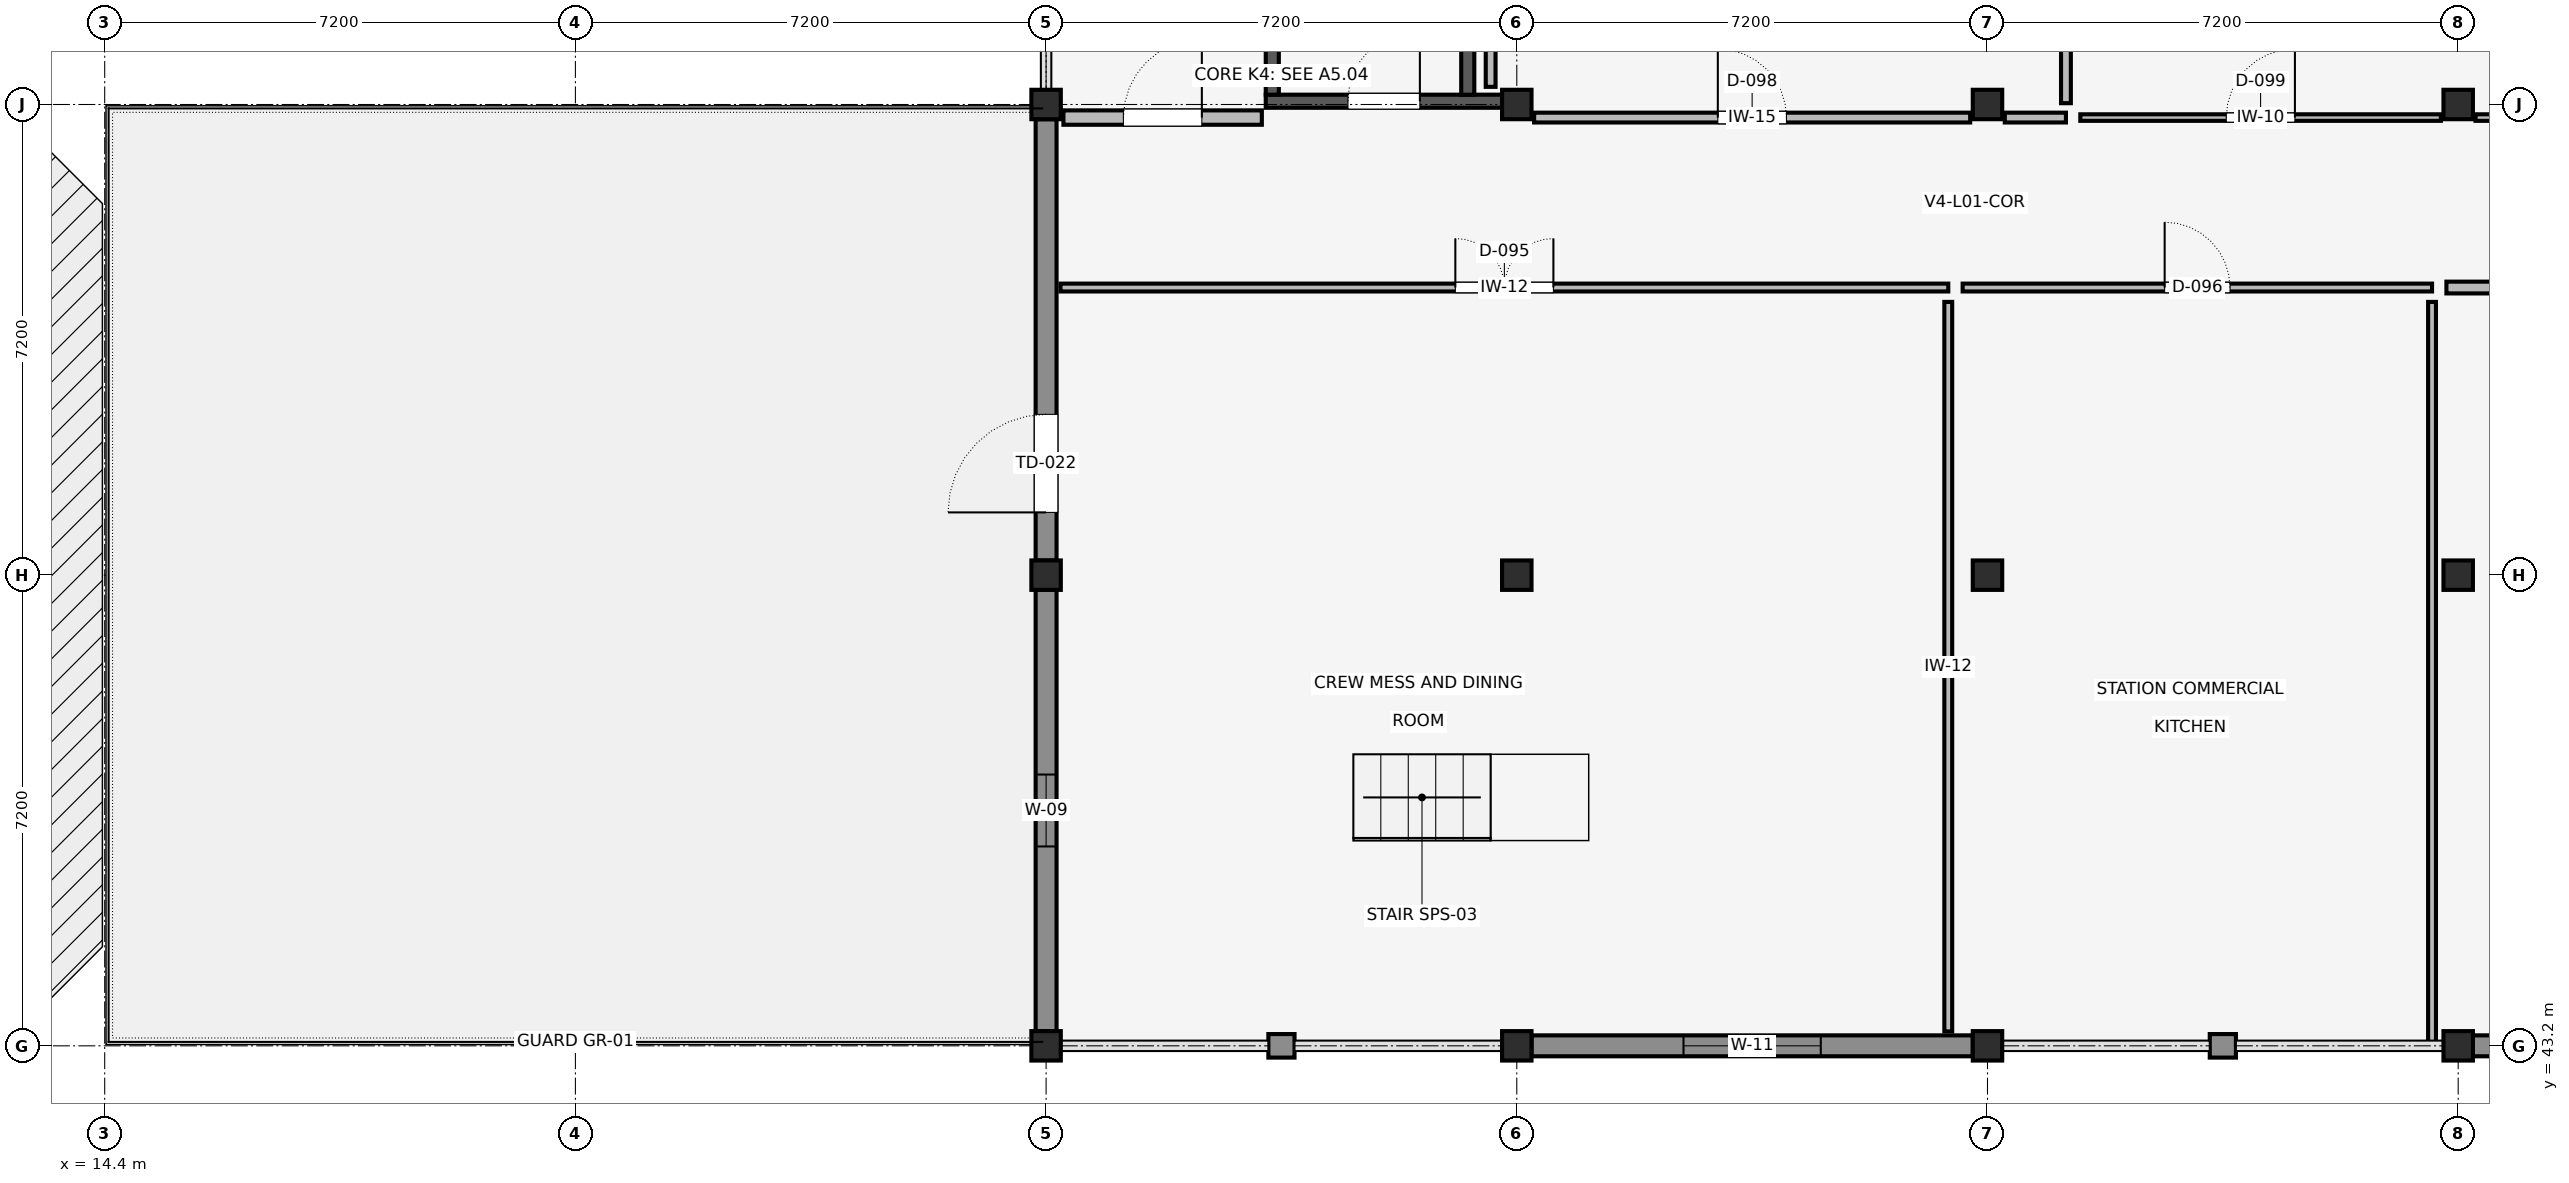
"""IFC4 building model, lengths in metres.
Left out: names, types, materials, properties, quantities, classifications, styles, units other than length and angle.
Written with IfcOpenShell. Run it as: python <this file> out.ifc"""

import sys

from ifc_helpers import new_model, si_unit, direction, frame, frame_2d, origin, origin_2d, place, context, subcontext, project, spatial, rectangle, extrude, element, fill, save


model = new_model("IFC4")
c1 = context("Model", 3, precision=1e-05, world=origin(), true_north=direction((0.0, 1.0)))
c2 = subcontext(c1, "Body", "Model", "MODEL_VIEW")
j1 = project(units=[si_unit("LENGTHUNIT", "METRE"), si_unit("PLANEANGLEUNIT", "RADIAN")], contexts=[c1])
p1 = place(None, origin())
s1 = spatial("IfcSite", under=j1, at=p1, CompositionType="ELEMENT")
p2 = place(p1, origin())
s2 = spatial("IfcBuilding", under=s1, at=p2, CompositionType="ELEMENT")
p3 = place(p2, frame((0.0, 0.0, 5.4)))
s3 = spatial("IfcBuildingStorey", under=s2, at=p3, CompositionType="ELEMENT", Elevation=5.4)
for number, where, z_axis, x_axis in (
    (1, (28.8, 43.2, 0.0), (0.0, 0.0, 1.0), (1.0, 0.0, 0.0)),
    (2, (28.8, 50.4, 0.0), (0.0, 0.0, 1.0), (1.0, 0.0, 0.0)),
    (3, (28.8, 57.6, 0.0), (0.0, 0.0, 1.0), (1.0, 0.0, 0.0)),
    (4, (36.0, 43.2, 0.0), (0.0, 0.0, 1.0), (1.0, 0.0, 0.0)),
    (5, (36.0, 50.4, 0.0), (0.0, 0.0, 1.0), (1.0, 0.0, 0.0)),
    (6, (36.0, 57.6, 0.0), (0.0, 0.0, 1.0), (1.0, 0.0, 0.0)),
    (7, (43.2, 43.2, 0.0), (0.0, 0.0, 1.0), (1.0, 0.0, 0.0)),
    (8, (43.2, 50.4, 0.0), (0.0, 0.0, 1.0), (1.0, 0.0, 0.0)),
    (9, (43.2, 57.6, 0.0), (0.0, 0.0, 1.0), (1.0, 0.0, 0.0)),
    (10, (50.4, 43.2, 0.0), (0.0, 0.0, 1.0), (1.0, 0.0, 0.0)),
    (11, (50.4, 50.4, 0.0), (0.0, 0.0, 1.0), (1.0, 0.0, 0.0)),
    (12, (50.4, 57.6, 0.0), (0.0, 0.0, 1.0), (1.0, 0.0, 0.0)),
):
    element("IfcColumn", number, at=place(p3, frame(where, z_axis=z_axis, x_axis=x_axis)), inside=s3, PredefinedType="COLUMN", context=c2, shape_type="SweptSolid", body=[
        extrude(rectangle(XDim=0.45, YDim=0.45, at=origin_2d()), origin(), (0.0, 0.0, 1.0), 4.2),
    ])
p4 = place(p3, frame((32.16, 57.65, 0.0), z_axis=(0.0, 0.0, 1.0), x_axis=(1.0, 0.0, 0.0)))
e13 = element("IfcWall", 13, at=p4, inside=s3, PredefinedType="SHEAR", context=c2, shape_type="SweptSolid", body=[
    extrude(rectangle(XDim=3.615, YDim=0.2, at=frame_2d((1.808, 0.0))), origin(), (0.0, 0.0, 1.0), 3.95),
])
p5 = place(p4, frame((1.258, 0.0, 0.0)))
e14 = element("IfcOpeningElement", 14, at=p5, cuts=e13, PredefinedType="OPENING", context=c2, shape_type="SweptSolid", body=[
    extrude(rectangle(XDim=1.1, YDim=2.15, at=frame_2d((0.55, 1.075))), frame((0.0, 0.112, 0.0), z_axis=(0.0, -1.0, 0.0), x_axis=(1.0, 0.0, 0.0)), (0.0, 0.0, 1.0), 0.224),
])
for number, where, z_axis, x_axis in (
    (15, (32.26, 57.75, 0.0), (0.0, 0.0, 1.0), (0.0, 1.0, 0.0)),
    (16, (35.25, 57.75, 0.0), (0.0, 0.0, 1.0), (0.0, 1.0, 0.0)),
):
    element("IfcWall", number, at=place(p3, frame(where, z_axis=z_axis, x_axis=x_axis)), inside=s3, PredefinedType="SHEAR", context=c2, shape_type="SweptSolid", body=[
        extrude(rectangle(XDim=6.56, YDim=0.2, at=frame_2d((3.28, 0.0))), origin(), (0.0, 0.0, 1.0), 3.95),
    ])
p6 = place(p3, frame((28.8, 57.375, 0.0), z_axis=(0.0, 0.0, 1.0), x_axis=(0.0, -1.0, 0.0)))
e17 = element("IfcWall", 17, at=p6, inside=s3, PredefinedType="ELEMENTEDWALL", context=c2, shape_type="SweptSolid", body=[
    extrude(rectangle(XDim=6.75, YDim=0.32, at=frame_2d((3.375, 0.0))), origin(), (0.0, 0.0, 1.0), 3.29),
])
p7 = place(p6, frame((4.515, 0.0, 0.0)))
e18 = element("IfcOpeningElement", 18, at=p7, cuts=e17, PredefinedType="OPENING", context=c2, shape_type="SweptSolid", body=[
    extrude(rectangle(XDim=1.5, YDim=2.2, at=frame_2d((0.75, 1.1))), frame((0.0, 0.172, 0.0), z_axis=(0.0, -1.0, 0.0), x_axis=(1.0, 0.0, 0.0)), (0.0, 0.0, 1.0), 0.344),
])
p8 = place(p3, frame((28.8, 50.175, 0.0), z_axis=(0.0, 0.0, 1.0), x_axis=(0.0, -1.0, 0.0)))
e19 = element("IfcWall", 19, at=p8, inside=s3, PredefinedType="ELEMENTEDWALL", context=c2, shape_type="SweptSolid", body=[
    extrude(rectangle(XDim=6.75, YDim=0.32, at=frame_2d((3.375, 0.0))), origin(), (0.0, 0.0, 1.0), 3.34),
])
p9 = place(p8, frame((2.825, 0.0, 0.85)))
e20 = element("IfcOpeningElement", 20, at=p9, cuts=e19, PredefinedType="OPENING", context=c2, shape_type="SweptSolid", body=[
    extrude(rectangle(XDim=1.1, YDim=1.75, at=frame_2d((0.55, 0.875))), frame((0.0, 0.172, 0.0), z_axis=(0.0, -1.0, 0.0), x_axis=(1.0, 0.0, 0.0)), (0.0, 0.0, 1.0), 0.344),
])
p10 = place(p3, frame((32.2, 43.2, 0.0), z_axis=(0.0, 0.0, 1.0), x_axis=(1.0, 0.0, 0.0)))
e21 = element("IfcWall", 21, at=p10, inside=s3, PredefinedType="SOLIDWALL", context=c2, shape_type="SweptSolid", body=[
    extrude(rectangle(XDim=0.4, YDim=0.36, at=frame_2d((0.2, 0.0))), origin(), (0.0, 0.0, 1.0), 3.29),
])
p11 = place(p3, frame((36.225, 43.2, 0.0), z_axis=(0.0, 0.0, 1.0), x_axis=(1.0, 0.0, 0.0)))
e22 = element("IfcWall", 22, at=p11, inside=s3, PredefinedType="ELEMENTEDWALL", context=c2, shape_type="SweptSolid", body=[
    extrude(rectangle(XDim=6.75, YDim=0.32, at=frame_2d((3.375, 0.0))), origin(), (0.0, 0.0, 1.0), 3.29),
])
p12 = place(p11, frame((2.325, 0.0, 0.85)))
e23 = element("IfcOpeningElement", 23, at=p12, cuts=e22, PredefinedType="OPENING", context=c2, shape_type="SweptSolid", body=[
    extrude(rectangle(XDim=2.1, YDim=2.15, at=frame_2d((1.05, 1.075))), frame((0.0, 0.172, 0.0), z_axis=(0.0, -1.0, 0.0), x_axis=(1.0, 0.0, 0.0)), (0.0, 0.0, 1.0), 0.344),
])
p13 = place(p3, frame((46.6, 43.2, 0.0), z_axis=(0.0, 0.0, 1.0), x_axis=(1.0, 0.0, 0.0)))
e24 = element("IfcWall", 24, at=p13, inside=s3, PredefinedType="SOLIDWALL", context=c2, shape_type="SweptSolid", body=[
    extrude(rectangle(XDim=0.4, YDim=0.36, at=frame_2d((0.2, 0.0))), origin(), (0.0, 0.0, 1.0), 3.29),
])
p14 = place(p3, frame((50.625, 43.2, 0.0), z_axis=(0.0, 0.0, 1.0), x_axis=(1.0, 0.0, 0.0)))
e25 = element("IfcWall", 25, at=p14, inside=s3, PredefinedType="ELEMENTEDWALL", context=c2, shape_type="SweptSolid", body=[
    extrude(rectangle(XDim=5.85, YDim=0.32, at=frame_2d((2.925, 0.0))), origin(), (0.0, 0.0, 1.0), 3.29),
])
p15 = place(p14, frame((1.725, 0.0, 1.6)))
e26 = element("IfcOpeningElement", 26, at=p15, cuts=e25, PredefinedType="OPENING", context=c2, shape_type="SweptSolid", body=[
    extrude(rectangle(XDim=2.4, YDim=1.05, at=frame_2d((1.2, 0.525))), frame((0.0, 0.172, 0.0), z_axis=(0.0, -1.0, 0.0), x_axis=(1.0, 0.0, 0.0)), (0.0, 0.0, 1.0), 0.344),
])
p16 = place(p3, frame((29.065, 57.4, 0.0), z_axis=(0.0, 0.0, 1.0), x_axis=(1.0, 0.0, 0.0)))
e27 = element("IfcWall", 27, at=p16, inside=s3, PredefinedType="STANDARD", context=c2, shape_type="SweptSolid", body=[
    extrude(rectangle(XDim=3.035, YDim=0.22, at=frame_2d((1.518, 0.0))), origin(), (0.0, 0.0, 1.0), 3.92),
])
p17 = place(p16, frame((0.917, 0.0, 0.0)))
e28 = element("IfcOpeningElement", 28, at=p17, cuts=e27, PredefinedType="OPENING", context=c2, shape_type="SweptSolid", body=[
    extrude(rectangle(XDim=1.2, YDim=2.2, at=frame_2d((0.6, 1.1))), frame((0.0, 0.122, 0.0), z_axis=(0.0, -1.0, 0.0), x_axis=(1.0, 0.0, 0.0)), (0.0, 0.0, 1.0), 0.244),
])
p18 = place(p3, frame((29.02, 54.8, 0.0), z_axis=(0.0, 0.0, 1.0), x_axis=(1.0, 0.0, 0.0)))
e29 = element("IfcWall", 29, at=p18, inside=s3, PredefinedType="PARTITIONING", context=c2, shape_type="SweptSolid", body=[
    extrude(rectangle(XDim=13.58, YDim=0.12, at=frame_2d((6.79, 0.0))), origin(), (0.0, 0.0, 1.0), 3.288),
])
p19 = place(p18, frame((6.04, 0.0, 0.0)))
e30 = element("IfcOpeningElement", 30, at=p19, cuts=e29, PredefinedType="OPENING", context=c2, shape_type="SweptSolid", body=[
    extrude(rectangle(XDim=1.5, YDim=2.2, at=frame_2d((0.75, 1.1))), frame((0.0, 0.072, 0.0), z_axis=(0.0, -1.0, 0.0), x_axis=(1.0, 0.0, 0.0)), (0.0, 0.0, 1.0), 0.144),
])
p20 = place(p3, frame((42.6, 43.42, 0.0), z_axis=(0.0, 0.0, 1.0), x_axis=(0.0, 1.0, 0.0)))
e31 = element("IfcWall", 31, at=p20, inside=s3, PredefinedType="PARTITIONING", context=c2, shape_type="SweptSolid", body=[
    extrude(rectangle(XDim=11.16, YDim=0.12, at=frame_2d((5.58, 0.0))), origin(), (0.0, 0.0, 1.0), 3.188),
])
p21 = place(p3, frame((42.82, 54.8, 0.0), z_axis=(0.0, 0.0, 1.0), x_axis=(1.0, 0.0, 0.0)))
e32 = element("IfcWall", 32, at=p21, inside=s3, PredefinedType="PARTITIONING", context=c2, shape_type="SweptSolid", body=[
    extrude(rectangle(XDim=7.18, YDim=0.12, at=frame_2d((3.59, 0.0))), origin(), (0.0, 0.0, 1.0), 3.288),
])
p22 = place(p21, frame((3.09, 0.0, 0.0)))
e33 = element("IfcOpeningElement", 33, at=p22, cuts=e32, PredefinedType="OPENING", context=c2, shape_type="SweptSolid", body=[
    extrude(rectangle(XDim=1.0, YDim=2.15, at=frame_2d((0.5, 1.075))), frame((0.0, 0.072, 0.0), z_axis=(0.0, -1.0, 0.0), x_axis=(1.0, 0.0, 0.0)), (0.0, 0.0, 1.0), 0.144),
])
p23 = place(p3, frame((50.0, 43.2, 0.0), z_axis=(0.0, 0.0, 1.0), x_axis=(0.0, 1.0, 0.0)))
e34 = element("IfcWall", 34, at=p23, inside=s3, PredefinedType="PARTITIONING", context=c2, shape_type="SweptSolid", body=[
    extrude(rectangle(XDim=11.38, YDim=0.12, at=frame_2d((5.69, 0.0))), origin(), (0.0, 0.0, 1.0), 3.238),
])
p24 = place(p3, frame((50.22, 54.8, 0.0), z_axis=(0.0, 0.0, 1.0), x_axis=(1.0, 0.0, 0.0)))
e35 = element("IfcWall", 35, at=p24, inside=s3, PredefinedType="PLUMBINGWALL", context=c2, shape_type="SweptSolid", body=[
    extrude(rectangle(XDim=6.48, YDim=0.18, at=frame_2d((3.24, 0.0))), origin(), (0.0, 0.0, 1.0), 3.288),
])
p25 = place(p24, frame((2.79, 0.0, 0.0)))
e36 = element("IfcOpeningElement", 36, at=p25, cuts=e35, PredefinedType="OPENING", context=c2, shape_type="SweptSolid", body=[
    extrude(rectangle(XDim=0.9, YDim=2.1, at=frame_2d((0.45, 1.05))), frame((0.0, 0.102, 0.0), z_axis=(0.0, -1.0, 0.0), x_axis=(1.0, 0.0, 0.0)), (0.0, 0.0, 1.0), 0.204),
])
p26 = place(p3, frame((36.265, 57.4, 0.0), z_axis=(0.0, 0.0, 1.0), x_axis=(1.0, 0.0, 0.0)))
e37 = element("IfcWall", 37, at=p26, inside=s3, PredefinedType="STANDARD", context=c2, shape_type="SweptSolid", body=[
    extrude(rectangle(XDim=6.67, YDim=0.15, at=frame_2d((3.335, 0.0))), origin(), (0.0, 0.0, 1.0), 3.238),
])
p27 = place(p26, frame((2.81, 0.0, 0.0)))
e38 = element("IfcOpeningElement", 38, at=p27, cuts=e37, PredefinedType="OPENING", context=c2, shape_type="SweptSolid", body=[
    extrude(rectangle(XDim=1.05, YDim=2.15, at=frame_2d((0.525, 1.075))), frame((0.0, 0.087, 0.0), z_axis=(0.0, -1.0, 0.0), x_axis=(1.0, 0.0, 0.0)), (0.0, 0.0, 1.0), 0.174),
])
p28 = place(p3, frame((43.465, 57.4, 0.0), z_axis=(0.0, 0.0, 1.0), x_axis=(1.0, 0.0, 0.0)))
e39 = element("IfcWall", 39, at=p28, inside=s3, PredefinedType="STANDARD", context=c2, shape_type="SweptSolid", body=[
    extrude(rectangle(XDim=0.935, YDim=0.15, at=frame_2d((0.467, 0.0))), origin(), (0.0, 0.0, 1.0), 3.188),
])
p29 = place(p3, frame((44.4, 57.62, 0.0), z_axis=(0.0, 0.0, 1.0), x_axis=(0.0, 1.0, 0.0)))
e40 = element("IfcWall", 40, at=p29, inside=s3, PredefinedType="STANDARD", context=c2, shape_type="SweptSolid", body=[
    extrude(rectangle(XDim=14.16, YDim=0.15, at=frame_2d((7.08, 0.0))), origin(), (0.0, 0.0, 1.0), 3.188),
])
p30 = place(p3, frame((35.6, 57.87, 0.0), z_axis=(0.0, 0.0, 1.0), x_axis=(0.0, 1.0, 0.0)))
e41 = element("IfcWall", 41, at=p30, inside=s3, PredefinedType="STANDARD", context=c2, shape_type="SweptSolid", body=[
    extrude(rectangle(XDim=13.91, YDim=0.15, at=frame_2d((6.955, 0.0))), origin(), (0.0, 0.0, 1.0), 3.238),
])
p31 = place(p3, frame((44.62, 57.4, 0.0), z_axis=(0.0, 0.0, 1.0), x_axis=(1.0, 0.0, 0.0)))
e42 = element("IfcWall", 42, at=p31, inside=s3, PredefinedType="PARTITIONING", context=c2, shape_type="SweptSolid", body=[
    extrude(rectangle(XDim=5.515, YDim=0.1, at=frame_2d((2.757, 0.0))), origin(), (0.0, 0.0, 1.0), 3.188),
])
p32 = place(p31, frame((2.232, 0.0, 0.0)))
e43 = element("IfcOpeningElement", 43, at=p32, cuts=e42, PredefinedType="OPENING", context=c2, shape_type="SweptSolid", body=[
    extrude(rectangle(XDim=1.05, YDim=2.15, at=frame_2d((0.525, 1.075))), frame((0.0, 0.062, 0.0), z_axis=(0.0, -1.0, 0.0), x_axis=(1.0, 0.0, 0.0)), (0.0, 0.0, 1.0), 0.124),
])
p33 = place(p3, frame((50.665, 57.4, 0.0), z_axis=(0.0, 0.0, 1.0), x_axis=(1.0, 0.0, 0.0)))
e44 = element("IfcWall", 44, at=p33, inside=s3, PredefinedType="PARTITIONING", context=c2, shape_type="SweptSolid", body=[
    extrude(rectangle(XDim=2.135, YDim=0.1, at=frame_2d((1.067, 0.0))), origin(), (0.0, 0.0, 1.0), 3.92),
])
p34 = place(p7, frame((1.5, 0.0, 0.0), z_axis=(0.0, 0.0, 1.0), x_axis=(-1.0, 0.0, 0.0)))
e45 = element("IfcDoor", 45, at=p34, inside=s3, OperationType="DOUBLE_SWING_LEFT", PredefinedType="DOOR", context=c2, shape_type="SweptSolid", body=[
    extrude(rectangle(XDim=1.5, YDim=2.2, at=frame_2d((0.75, 1.1))), frame((0.0, 0.025, 0.0), z_axis=(0.0, -1.0, 0.0), x_axis=(1.0, 0.0, 0.0)), (0.0, 0.0, 1.0), 0.05),
])
fill(e18, e45)
p35 = place(p9, origin())
e46 = element("IfcWindow", 46, at=p35, inside=s3, PartitioningType="SINGLE_PANEL", PredefinedType="WINDOW", context=c2, shape_type="SweptSolid", body=[
    extrude(rectangle(XDim=1.1, YDim=1.75, at=frame_2d((0.55, 0.875))), frame((0.0, 0.03, 0.0), z_axis=(0.0, -1.0, 0.0), x_axis=(1.0, 0.0, 0.0)), (0.0, 0.0, 1.0), 0.06),
])
fill(e20, e46)
p36 = place(p12, origin())
e47 = element("IfcWindow", 47, at=p36, inside=s3, PartitioningType="SINGLE_PANEL", PredefinedType="WINDOW", context=c2, shape_type="SweptSolid", body=[
    extrude(rectangle(XDim=2.1, YDim=2.15, at=frame_2d((1.05, 1.075))), frame((0.0, 0.03, 0.0), z_axis=(0.0, -1.0, 0.0), x_axis=(1.0, 0.0, 0.0)), (0.0, 0.0, 1.0), 0.06),
])
fill(e23, e47)
p37 = place(p5, origin())
e48 = element("IfcDoor", 48, at=p37, inside=s3, OperationType="SINGLE_SWING_RIGHT", PredefinedType="DOOR", context=c2, shape_type="SweptSolid", body=[
    extrude(rectangle(XDim=1.1, YDim=2.15, at=frame_2d((0.55, 1.075))), frame((0.0, 0.025, 0.0), z_axis=(0.0, -1.0, 0.0), x_axis=(1.0, 0.0, 0.0)), (0.0, 0.0, 1.0), 0.05),
])
fill(e14, e48)
p38 = place(p17, origin())
e49 = element("IfcDoor", 49, at=p38, inside=s3, OperationType="SINGLE_SWING_RIGHT", PredefinedType="DOOR", context=c2, shape_type="SweptSolid", body=[
    extrude(rectangle(XDim=1.2, YDim=2.2, at=frame_2d((0.6, 1.1))), frame((0.0, 0.025, 0.0), z_axis=(0.0, -1.0, 0.0), x_axis=(1.0, 0.0, 0.0)), (0.0, 0.0, 1.0), 0.05),
])
fill(e28, e49)
p39 = place(p19, origin())
e50 = element("IfcDoor", 50, at=p39, inside=s3, OperationType="DOUBLE_SWING_LEFT", PredefinedType="DOOR", context=c2, shape_type="SweptSolid", body=[
    extrude(rectangle(XDim=1.5, YDim=2.2, at=frame_2d((0.75, 1.1))), frame((0.0, 0.025, 0.0), z_axis=(0.0, -1.0, 0.0), x_axis=(1.0, 0.0, 0.0)), (0.0, 0.0, 1.0), 0.05),
])
fill(e30, e50)
p40 = place(p22, origin())
e51 = element("IfcDoor", 51, at=p40, inside=s3, OperationType="SINGLE_SWING_LEFT", PredefinedType="DOOR", context=c2, shape_type="SweptSolid", body=[
    extrude(rectangle(XDim=1.0, YDim=2.15, at=frame_2d((0.5, 1.075))), frame((0.0, 0.025, 0.0), z_axis=(0.0, -1.0, 0.0), x_axis=(1.0, 0.0, 0.0)), (0.0, 0.0, 1.0), 0.05),
])
fill(e33, e51)
p41 = place(p27, origin())
e52 = element("IfcDoor", 52, at=p41, inside=s3, OperationType="SINGLE_SWING_LEFT", PredefinedType="DOOR", context=c2, shape_type="SweptSolid", body=[
    extrude(rectangle(XDim=1.05, YDim=2.15, at=frame_2d((0.525, 1.075))), frame((0.0, 0.025, 0.0), z_axis=(0.0, -1.0, 0.0), x_axis=(1.0, 0.0, 0.0)), (0.0, 0.0, 1.0), 0.05),
])
fill(e38, e52)
p42 = place(p32, origin())
e53 = element("IfcDoor", 53, at=p42, inside=s3, OperationType="SINGLE_SWING_RIGHT", PredefinedType="DOOR", context=c2, shape_type="SweptSolid", body=[
    extrude(rectangle(XDim=1.05, YDim=2.15, at=frame_2d((0.525, 1.075))), frame((0.0, 0.025, 0.0), z_axis=(0.0, -1.0, 0.0), x_axis=(1.0, 0.0, 0.0)), (0.0, 0.0, 1.0), 0.05),
])
fill(e43, e53)
save(model, sys.argv[1])
